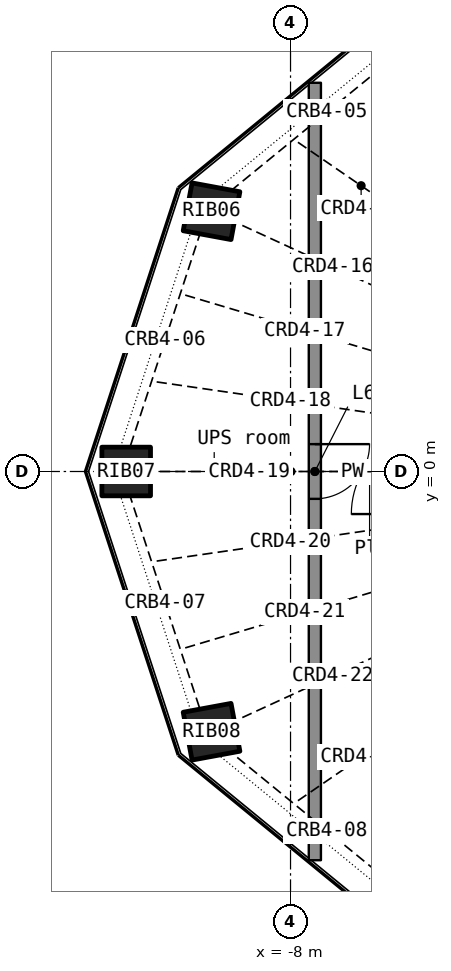
"""IFC4 building model, lengths in metres.
Left out: names, types, materials, properties, quantities, classifications, styles, units other than length and angle.
Written with IfcOpenShell. Run it as: python <this file> out.ifc"""

import sys

from ifc_helpers import new_model, si_unit, direction, frame, frame_2d, origin, origin_2d, place, context, subcontext, project, spatial, rectangle, hollow_rectangle, extrude, element, fill, save


model = new_model("IFC4")
c1 = context("Model", 3, precision=1e-05, world=origin(), true_north=direction((0.0, 1.0)))
c2 = subcontext(c1, "Body", "Model", "MODEL_VIEW")
j1 = project(units=[si_unit("LENGTHUNIT", "METRE"), si_unit("PLANEANGLEUNIT", "RADIAN")], contexts=[c1])
p1 = place(None, origin())
s1 = spatial("IfcSite", under=j1, at=p1, CompositionType="ELEMENT")
p2 = place(p1, origin())
s2 = spatial("IfcBuilding", under=s1, at=p2, CompositionType="ELEMENT")
p3 = place(p2, frame((0.0, 0.0, 284.3)))
s3 = spatial("IfcBuildingStorey", under=s2, at=p3, CompositionType="ELEMENT", Elevation=284.3)
p4 = place(p3, frame((-9.299, 4.28, 0.0), z_axis=(0.119034705, -0.054800649, 0.991376633), x_axis=(0.574755771, 0.817978965, -0.023795301)))
e1 = element("IfcColumn", 1, at=p4, inside=s3, PredefinedType="COLUMN", context=c2, shape_type="SweptSolid", body=[
    extrude(hollow_rectangle(XDim=0.8, YDim=0.8, WallThickness=0.025, at=origin_2d()), origin(), (0.0, 0.0, 1.0), 3.934),
])
p5 = place(p3, frame((-10.703, 0.0, 0.0), z_axis=(0.136861927, 0.0, 0.990590134), x_axis=(0.0, 1.0, 0.0)))
e2 = element("IfcColumn", 2, at=p5, inside=s3, PredefinedType="COLUMN", context=c2, shape_type="SweptSolid", body=[
    extrude(hollow_rectangle(XDim=0.8, YDim=0.8, WallThickness=0.025, at=origin_2d()), origin(), (0.0, 0.0, 1.0), 3.937),
])
p6 = place(p3, frame((-9.299, -4.28, 0.0), z_axis=(0.119034705, 0.054800649, 0.991376633), x_axis=(-0.574755771, 0.817978965, 0.023795301)))
e3 = element("IfcColumn", 3, at=p6, inside=s3, PredefinedType="COLUMN", context=c2, shape_type="SweptSolid", body=[
    extrude(hollow_rectangle(XDim=0.8, YDim=0.8, WallThickness=0.025, at=origin_2d()), origin(), (0.0, 0.0, 1.0), 3.934),
])
p7 = place(p3, frame((-7.6, 6.393, 0.0), z_axis=(0.0, 0.0, 1.0), x_axis=(0.0, -1.0, 0.0)))
e4 = element("IfcWall", 4, at=p7, inside=s3, PredefinedType="PARTITIONING", context=c2, shape_type="SweptSolid", body=[
    extrude(rectangle(XDim=12.787, YDim=0.2, at=frame_2d((6.393, 0.0))), origin(), (0.0, 0.0, 1.0), 2.9),
])
p8 = place(p7, frame((5.943, 0.0, 0.0)))
e5 = element("IfcOpeningElement", 5, at=p8, cuts=e4, PredefinedType="OPENING", context=c2, shape_type="SweptSolid", body=[
    extrude(rectangle(XDim=0.9, YDim=2.1, at=frame_2d((0.45, 1.05))), frame((0.0, 0.11, 0.0), z_axis=(0.0, -1.0, 0.0), x_axis=(1.0, 0.0, 0.0)), (0.0, 0.0, 1.0), 0.22),
])
for number, where, z_axis, x_axis in (
    (6, (-8.091, -6.0, 0.0), (0.0, 0.0, 1.0), (1.0, 0.0, 0.0)),
    (7, (-5.813, 6.0, 0.0), (0.0, 0.0, 1.0), (-1.0, 0.0, 0.0)),
):
    element("IfcWall", number, at=place(p3, frame(where, z_axis=z_axis, x_axis=x_axis)), inside=s3, PredefinedType="PARTITIONING", context=c2, shape_type="SweptSolid", body=[
        extrude(rectangle(XDim=2.278, YDim=0.2, at=frame_2d((1.139, 0.0))), origin(), (0.0, 0.0, 1.0), 2.9),
    ])
p9 = place(p8, origin())
e8 = element("IfcDoor", 8, at=p9, inside=s3, OperationType="SINGLE_SWING_LEFT", PredefinedType="DOOR", context=c2, shape_type="SweptSolid", body=[
    extrude(rectangle(XDim=0.9, YDim=2.1, at=frame_2d((0.45, 1.05))), frame((0.0, 0.025, 0.0), z_axis=(0.0, -1.0, 0.0), x_axis=(1.0, 0.0, 0.0)), (0.0, 0.0, 1.0), 0.05),
])
fill(e5, e8)
save(model, sys.argv[1])
